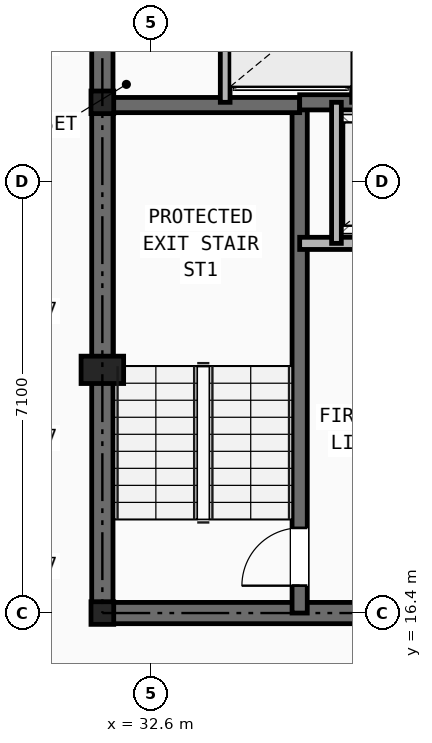
"""IFC4 building model, lengths in metres.
Left out: names, types, materials, properties, quantities, classifications, styles, units other than length and angle.
Written with IfcOpenShell. Run it as: python <this file> out.ifc"""

import sys

from ifc_helpers import new_model, si_unit, direction, frame, frame_2d, origin, origin_2d, place, context, subcontext, project, spatial, rectangle, i_section, extrude, element, fill, save


model = new_model("IFC4")
c1 = context("Model", 3, precision=1e-05, world=origin(), true_north=direction((0.0, 1.0)))
c2 = subcontext(c1, "Body", "Model", "MODEL_VIEW")
j1 = project(units=[si_unit("LENGTHUNIT", "METRE"), si_unit("PLANEANGLEUNIT", "RADIAN")], contexts=[c1])
p1 = place(None, origin())
s1 = spatial("IfcSite", under=j1, at=p1, CompositionType="ELEMENT")
p2 = place(p1, origin())
s2 = spatial("IfcBuilding", under=s1, at=p2, CompositionType="ELEMENT")
p3 = place(p2, frame((0.0, 0.0, 186.15)))
s3 = spatial("IfcBuildingStorey", under=s2, at=p3, CompositionType="ELEMENT", Elevation=186.15)
for number, where, z_axis, x_axis in (
    (1, (31.8, 16.4, 0.0), (0.0, 0.0, 1.0), (1.0, 0.0, 0.0)),
    (2, (31.8, 24.8, 0.0), (0.0, 0.0, 1.0), (1.0, 0.0, 0.0)),
):
    element("IfcColumn", number, at=place(p3, frame(where, z_axis=z_axis, x_axis=x_axis)), inside=s3, PredefinedType="COLUMN", context=c2, shape_type="SweptSolid", body=[
        extrude(i_section(OverallWidth=0.374, OverallDepth=0.372, WebThickness=0.016, FlangeThickness=0.026, at=origin_2d()), origin(), (0.0, 0.0, 1.0), 3.45),
    ])
p4 = place(p3, frame((31.8, 20.4, 0.0), z_axis=(0.0, 0.0, 1.0), x_axis=(1.0, 0.0, 0.0)))
e3 = element("IfcColumn", 3, at=p4, inside=s3, PredefinedType="PILASTER", context=c2, shape_type="SweptSolid", body=[
    extrude(rectangle(XDim=0.7, YDim=0.45, at=origin_2d()), origin(), (0.0, 0.0, 1.0), 3.45),
])
p5 = place(p3, frame((31.8, 16.4, 0.0), z_axis=(0.0, 0.0, 1.0), x_axis=(1.0, 0.0, 0.0)))
e4 = element("IfcWall", 4, at=p5, inside=s3, PredefinedType="SHEAR", context=c2, shape_type="SweptSolid", body=[
    extrude(rectangle(XDim=16.4, YDim=0.35, at=frame_2d((8.2, 0.0))), origin(), (0.0, 0.0, 1.0), 3.21),
])
p6 = place(p5, frame((7.75, 0.0, 0.0)))
e5 = element("IfcOpeningElement", 5, at=p6, cuts=e4, PredefinedType="OPENING", context=c2, shape_type="SweptSolid", body=[
    extrude(rectangle(XDim=0.9, YDim=2.1, at=frame_2d((0.45, 1.05))), frame((0.0, 0.185, 0.0), z_axis=(0.0, -1.0, 0.0), x_axis=(1.0, 0.0, 0.0)), (0.0, 0.0, 1.0), 0.37),
])
p7 = place(p5, frame((4.2, 0.0, 0.0)))
e6 = element("IfcOpeningElement", 6, at=p7, cuts=e4, PredefinedType="OPENING", context=c2, shape_type="SweptSolid", body=[
    extrude(rectangle(XDim=0.95, YDim=2.1, at=frame_2d((0.475, 1.05))), frame((0.0, 0.185, 0.0), z_axis=(0.0, -1.0, 0.0), x_axis=(1.0, 0.0, 0.0)), (0.0, 0.0, 1.0), 0.37),
])
p8 = place(p5, frame((10.6, 0.0, 0.0)))
e7 = element("IfcOpeningElement", 7, at=p8, cuts=e4, PredefinedType="OPENING", context=c2, shape_type="SweptSolid", body=[
    extrude(rectangle(XDim=0.95, YDim=2.1, at=frame_2d((0.475, 1.05))), frame((0.0, 0.185, 0.0), z_axis=(0.0, -1.0, 0.0), x_axis=(1.0, 0.0, 0.0)), (0.0, 0.0, 1.0), 0.37),
])
p9 = place(p3, frame((31.8, 16.4, 0.0), z_axis=(0.0, 0.0, 1.0), x_axis=(0.0, 1.0, 0.0)))
e8 = element("IfcWall", 8, at=p9, inside=s3, PredefinedType="SHEAR", context=c2, shape_type="SweptSolid", body=[
    extrude(rectangle(XDim=14.8, YDim=0.35, at=frame_2d((7.4, 0.0))), origin(), (0.0, 0.0, 1.0), 3.21),
])
p10 = place(p9, frame((11.0, 0.0, 0.0)))
e9 = element("IfcOpeningElement", 9, at=p10, cuts=e8, PredefinedType="OPENING", context=c2, shape_type="SweptSolid", body=[
    extrude(rectangle(XDim=1.1, YDim=2.15, at=frame_2d((0.55, 1.075))), frame((0.0, 0.185, 0.0), z_axis=(0.0, -1.0, 0.0), x_axis=(1.0, 0.0, 0.0)), (0.0, 0.0, 1.0), 0.37),
])
p11 = place(p3, frame((35.045, 16.4, 0.0), z_axis=(0.0, 0.0, 1.0), x_axis=(0.0, 1.0, 0.0)))
e10 = element("IfcWall", 10, at=p11, inside=s3, PredefinedType="SHEAR", context=c2, shape_type="SweptSolid", body=[
    extrude(rectangle(XDim=8.4, YDim=0.25, at=frame_2d((4.2, 0.0))), origin(), (0.0, 0.0, 1.0), 3.21),
])
p12 = place(p11, frame((0.45, 0.0, 0.0)))
e11 = element("IfcOpeningElement", 11, at=p12, cuts=e10, PredefinedType="OPENING", context=c2, shape_type="SweptSolid", body=[
    extrude(rectangle(XDim=0.95, YDim=2.1, at=frame_2d((0.475, 1.05))), frame((0.0, 0.135, 0.0), z_axis=(0.0, -1.0, 0.0), x_axis=(1.0, 0.0, 0.0)), (0.0, 0.0, 1.0), 0.27),
])
p13 = place(p3, frame((31.8, 24.755, 0.0), z_axis=(0.0, 0.0, 1.0), x_axis=(1.0, 0.0, 0.0)))
e12 = element("IfcWall", 12, at=p13, inside=s3, PredefinedType="SHEAR", context=c2, shape_type="SweptSolid", body=[
    extrude(rectangle(XDim=3.245, YDim=0.25, at=frame_2d((1.623, 0.0))), origin(), (0.0, 0.0, 1.0), 3.21),
])
p14 = place(p3, frame((35.045, 24.8, 0.0), z_axis=(0.0, 0.0, 1.0), x_axis=(1.0, 0.0, 0.0)))
e13 = element("IfcWall", 13, at=p14, inside=s3, PredefinedType="SHEAR", context=c2, shape_type="SweptSolid", body=[
    extrude(rectangle(XDim=9.91, YDim=0.25, at=frame_2d((4.955, 0.0))), origin(), (0.0, 0.0, 1.0), 3.21),
])
p15 = place(p3, frame((35.045, 22.48, 0.0), z_axis=(0.0, 0.0, 1.0), x_axis=(1.0, 0.0, 0.0)))
e14 = element("IfcWall", 14, at=p15, inside=s3, PredefinedType="SOLIDWALL", context=c2, shape_type="SweptSolid", body=[
    extrude(rectangle(XDim=9.91, YDim=0.2, at=frame_2d((4.955, 0.0))), origin(), (0.0, 0.0, 1.0), 3.21),
])
p16 = place(p15, frame((1.255, 0.0, 0.0)))
e15 = element("IfcOpeningElement", 15, at=p16, cuts=e14, PredefinedType="OPENING", context=c2, shape_type="SweptSolid", body=[
    extrude(rectangle(XDim=1.1, YDim=2.15, at=frame_2d((0.55, 1.075))), frame((0.0, 0.11, 0.0), z_axis=(0.0, -1.0, 0.0), x_axis=(1.0, 0.0, 0.0)), (0.0, 0.0, 1.0), 0.22),
])
p17 = place(p15, frame((7.555, 0.0, 0.0)))
e16 = element("IfcOpeningElement", 16, at=p17, cuts=e14, PredefinedType="OPENING", context=c2, shape_type="SweptSolid", body=[
    extrude(rectangle(XDim=1.1, YDim=2.15, at=frame_2d((0.55, 1.075))), frame((0.0, 0.11, 0.0), z_axis=(0.0, -1.0, 0.0), x_axis=(1.0, 0.0, 0.0)), (0.0, 0.0, 1.0), 0.22),
])
p18 = place(p15, frame((4.405, 0.0, 0.0)))
e17 = element("IfcOpeningElement", 17, at=p18, cuts=e14, PredefinedType="OPENING", context=c2, shape_type="SweptSolid", body=[
    extrude(rectangle(XDim=1.1, YDim=2.15, at=frame_2d((0.55, 1.075))), frame((0.0, 0.11, 0.0), z_axis=(0.0, -1.0, 0.0), x_axis=(1.0, 0.0, 0.0)), (0.0, 0.0, 1.0), 0.22),
])
p19 = place(p3, frame((35.65, 22.48, 0.0), z_axis=(0.0, 0.0, 1.0), x_axis=(0.0, 1.0, 0.0)))
e18 = element("IfcWall", 18, at=p19, inside=s3, PredefinedType="SOLIDWALL", context=c2, shape_type="SweptSolid", body=[
    extrude(rectangle(XDim=2.32, YDim=0.16, at=frame_2d((1.16, 0.0))), origin(), (0.0, 0.0, 1.0), 3.21),
])
for number, where, z_axis, x_axis in (
    (19, (33.82, 24.8, 0.0), (0.0, 0.0, 1.0), (0.0, 1.0, 0.0)),
    (20, (35.98, 24.8, 0.0), (0.0, 0.0, 1.0), (0.0, 1.0, 0.0)),
):
    element("IfcWall", number, at=place(p3, frame(where, z_axis=z_axis, x_axis=x_axis)), inside=s3, PredefinedType="SOLIDWALL", context=c2, shape_type="SweptSolid", body=[
        extrude(rectangle(XDim=2.08, YDim=0.16, at=frame_2d((1.04, 0.0))), origin(), (0.0, 0.0, 1.0), 3.21),
    ])
p20 = place(p12, origin())
e21 = element("IfcDoor", 21, at=p20, inside=s3, OperationType="SINGLE_SWING_LEFT", PredefinedType="DOOR", context=c2, shape_type="SweptSolid", body=[
    extrude(rectangle(XDim=0.95, YDim=2.1, at=frame_2d((0.475, 1.05))), frame((0.0, 0.025, 0.0), z_axis=(0.0, -1.0, 0.0), x_axis=(1.0, 0.0, 0.0)), (0.0, 0.0, 1.0), 0.05),
])
fill(e11, e21)
save(model, sys.argv[1])
